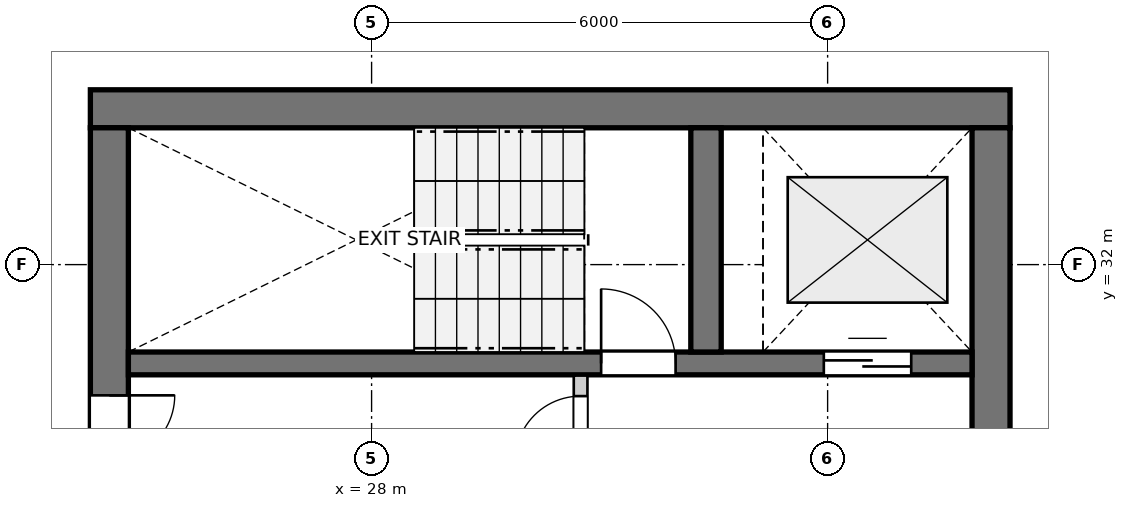
"""IFC4 building model, lengths in metres.
Left out: names, types, materials, properties, quantities, classifications, styles, units other than length and angle.
Written with IfcOpenShell. Run it as: python <this file> out.ifc"""

import sys

from ifc_helpers import new_model, si_unit, direction, frame, frame_2d, origin, place, context, subcontext, project, spatial, rectangle, extrude, source, transform, mapped, element, fill, save


model = new_model("IFC4")
c1 = context("Model", 3, precision=1e-05, world=origin(), true_north=direction((0.0, 1.0)))
c2 = subcontext(c1, "Body", "Model", "MODEL_VIEW")
j1 = project(units=[si_unit("LENGTHUNIT", "METRE"), si_unit("PLANEANGLEUNIT", "RADIAN")], contexts=[c1])
p1 = place(None, origin())
s1 = spatial("IfcSite", under=j1, at=p1, CompositionType="ELEMENT")
p2 = place(p1, origin())
s2 = spatial("IfcBuilding", under=s1, at=p2, CompositionType="ELEMENT")
p3 = place(p2, frame((0.0, 0.0, 198.8)))
s3 = spatial("IfcBuildingStorey", under=s2, at=p3, CompositionType="ELEMENT", Elevation=198.8)
p4 = place(p3, frame((36.4, 34.05, 0.0), z_axis=(0.0, 0.0, 1.0), x_axis=(-1.0, 0.0, 0.0)))
e1 = element("IfcWall", 1, at=p4, inside=s3, PredefinedType="SHEAR", context=c2, shape_type="SweptSolid", body=[
    extrude(rectangle(XDim=12.1, YDim=0.5, at=frame_2d((6.05, 0.0))), origin(), (0.0, 0.0, 1.0), 2.96),
])
p5 = place(p3, frame((24.55, 33.8, 0.0), z_axis=(0.0, 0.0, 1.0), x_axis=(0.0, -1.0, 0.0)))
e2 = element("IfcWall", 2, at=p5, inside=s3, PredefinedType="SHEAR", context=c2, shape_type="SweptSolid", body=[
    extrude(rectangle(XDim=15.6, YDim=0.5, at=frame_2d((7.8, 0.0))), origin(), (0.0, 0.0, 1.0), 2.96),
])
p6 = place(p5, frame((7.05, 0.0, 0.0)))
e3 = element("IfcOpeningElement", 3, at=p6, cuts=e2, PredefinedType="OPENING", context=c2, shape_type="SweptSolid", body=[
    extrude(rectangle(XDim=1.5, YDim=2.15, at=frame_2d((0.75, 1.075))), frame((0.0, 0.26, 0.0), z_axis=(0.0, -1.0, 0.0), x_axis=(1.0, 0.0, 0.0)), (0.0, 0.0, 1.0), 0.52),
])
p7 = place(p5, frame((3.52, 0.0, 0.0)))
e4 = element("IfcOpeningElement", 4, at=p7, cuts=e2, PredefinedType="OPENING", context=c2, shape_type="SweptSolid", body=[
    extrude(rectangle(XDim=0.86, YDim=2.05, at=frame_2d((0.43, 1.025))), frame((0.0, 0.26, 0.0), z_axis=(0.0, -1.0, 0.0), x_axis=(1.0, 0.0, 0.0)), (0.0, 0.0, 1.0), 0.52),
])
p8 = place(p5, frame((11.22, 0.0, 0.0)))
e5 = element("IfcOpeningElement", 5, at=p8, cuts=e2, PredefinedType="OPENING", context=c2, shape_type="SweptSolid", body=[
    extrude(rectangle(XDim=0.86, YDim=2.05, at=frame_2d((0.43, 1.025))), frame((0.0, 0.26, 0.0), z_axis=(0.0, -1.0, 0.0), x_axis=(1.0, 0.0, 0.0)), (0.0, 0.0, 1.0), 0.52),
])
p9 = place(p3, frame((36.15, 18.2, 0.0), z_axis=(0.0, 0.0, 1.0), x_axis=(0.0, 1.0, 0.0)))
e6 = element("IfcWall", 6, at=p9, inside=s3, PredefinedType="SHEAR", context=c2, shape_type="SweptSolid", body=[
    extrude(rectangle(XDim=15.6, YDim=0.5, at=frame_2d((7.8, 0.0))), origin(), (0.0, 0.0, 1.0), 2.96),
])
p10 = place(p9, frame((4.25, 0.0, 0.0)))
e7 = element("IfcOpeningElement", 7, at=p10, cuts=e6, PredefinedType="OPENING", context=c2, shape_type="SweptSolid", body=[
    extrude(rectangle(XDim=1.1, YDim=2.15, at=frame_2d((0.55, 1.075))), frame((0.0, 0.26, 0.0), z_axis=(0.0, -1.0, 0.0), x_axis=(1.0, 0.0, 0.0)), (0.0, 0.0, 1.0), 0.52),
])
p11 = place(p9, frame((10.25, 0.0, 0.0)))
e8 = element("IfcOpeningElement", 8, at=p11, cuts=e6, PredefinedType="OPENING", context=c2, shape_type="SweptSolid", body=[
    extrude(rectangle(XDim=1.1, YDim=2.15, at=frame_2d((0.55, 1.075))), frame((0.0, 0.26, 0.0), z_axis=(0.0, -1.0, 0.0), x_axis=(1.0, 0.0, 0.0)), (0.0, 0.0, 1.0), 0.52),
])
p12 = place(p3, frame((24.8, 30.7, 0.0), z_axis=(0.0, 0.0, 1.0), x_axis=(1.0, 0.0, 0.0)))
e9 = element("IfcWall", 9, at=p12, inside=s3, PredefinedType="SHEAR", context=c2, shape_type="SweptSolid", body=[
    extrude(rectangle(XDim=11.1, YDim=0.3, at=frame_2d((5.55, 0.0))), origin(), (0.0, 0.0, 1.0), 2.96),
])
p13 = place(p12, frame((6.22, 0.0, 0.0)))
e10 = element("IfcOpeningElement", 10, at=p13, cuts=e9, PredefinedType="OPENING", context=c2, shape_type="SweptSolid", body=[
    extrude(rectangle(XDim=0.98, YDim=2.15, at=frame_2d((0.49, 1.075))), frame((0.0, 0.16, 0.0), z_axis=(0.0, -1.0, 0.0), x_axis=(1.0, 0.0, 0.0)), (0.0, 0.0, 1.0), 0.32),
])
p14 = place(p12, frame((9.15, 0.0, 0.0)))
e11 = element("IfcOpeningElement", 11, at=p14, cuts=e9, PredefinedType="OPENING", context=c2, shape_type="SweptSolid", body=[
    extrude(rectangle(XDim=1.15, YDim=2.15, at=frame_2d((0.575, 1.075))), frame((0.0, 0.16, 0.0), z_axis=(0.0, -1.0, 0.0), x_axis=(1.0, 0.0, 0.0)), (0.0, 0.0, 1.0), 0.32),
])
p15 = place(p3, frame((32.4, 30.85, 0.0), z_axis=(0.0, 0.0, 1.0), x_axis=(0.0, 1.0, 0.0)))
e12 = element("IfcWall", 12, at=p15, inside=s3, PredefinedType="SHEAR", context=c2, shape_type="SweptSolid", body=[
    extrude(rectangle(XDim=2.95, YDim=0.4, at=frame_2d((1.475, 0.0))), origin(), (0.0, 0.0, 1.0), 2.96),
])
p16 = place(p3, frame((30.75, 27.43, 0.0), z_axis=(0.0, 0.0, 1.0), x_axis=(0.0, 1.0, 0.0)))
e13 = element("IfcWall", 13, at=p16, inside=s3, PredefinedType="PARTITIONING", context=c2, shape_type="SweptSolid", body=[
    extrude(rectangle(XDim=3.11, YDim=0.18, at=frame_2d((1.555, 0.0))), origin(), (0.0, 0.0, 1.0), 2.96),
])
p17 = place(p16, frame((1.98, 0.0, 0.0)))
e14 = element("IfcOpeningElement", 14, at=p17, cuts=e13, PredefinedType="OPENING", context=c2, shape_type="SweptSolid", body=[
    extrude(rectangle(XDim=0.86, YDim=2.05, at=frame_2d((0.43, 1.025))), frame((0.0, 0.1, 0.0), z_axis=(0.0, -1.0, 0.0), x_axis=(1.0, 0.0, 0.0)), (0.0, 0.0, 1.0), 0.2),
])
m1 = source(origin(), c2, "Body", "SweptSolid", [
    extrude(rectangle(XDim=0.98, YDim=2.15, at=frame_2d((0.49, 1.075))), frame((0.0, 0.025, 0.0), z_axis=(0.0, -1.0, 0.0), x_axis=(1.0, 0.0, 0.0)), (0.0, 0.0, 1.0), 0.05),
])
p18 = place(p13, origin())
e15 = element("IfcDoor", 15, at=p18, inside=s3, OperationType="SINGLE_SWING_LEFT", PredefinedType="DOOR", context=c2, shape_type="MappedRepresentation", body=[
    mapped(m1, transform((0.0, 0.0, 0.0), x_axis=(1.0, 0.0, 0.0), y_axis=(0.0, 1.0, 0.0), z_axis=(0.0, 0.0, 1.0), scale=1.0)),
])
fill(e10, e15)
m2 = source(origin(), c2, "Body", "SweptSolid", [
    extrude(rectangle(XDim=1.15, YDim=2.15, at=frame_2d((0.575, 1.075))), frame((0.0, 0.025, 0.0), z_axis=(0.0, -1.0, 0.0), x_axis=(1.0, 0.0, 0.0)), (0.0, 0.0, 1.0), 0.05),
])
p19 = place(p14, origin())
e16 = element("IfcDoor", 16, at=p19, inside=s3, OperationType="DOUBLE_DOOR_SLIDING", PredefinedType="DOOR", context=c2, shape_type="MappedRepresentation", body=[
    mapped(m2, transform((0.0, 0.0, 0.0), x_axis=(1.0, 0.0, 0.0), y_axis=(0.0, 1.0, 0.0), z_axis=(0.0, 0.0, 1.0), scale=1.0)),
])
fill(e11, e16)
m3 = source(origin(), c2, "Body", "SweptSolid", [
    extrude(rectangle(XDim=0.86, YDim=2.05, at=frame_2d((0.43, 1.025))), frame((0.0, 0.025, 0.0), z_axis=(0.0, -1.0, 0.0), x_axis=(1.0, 0.0, 0.0)), (0.0, 0.0, 1.0), 0.05),
])
p20 = place(p7, origin())
e17 = element("IfcDoor", 17, at=p20, inside=s3, OperationType="SINGLE_SWING_LEFT", PredefinedType="DOOR", context=c2, shape_type="MappedRepresentation", body=[
    mapped(m3, transform((0.0, 0.0, 0.0), x_axis=(1.0, 0.0, 0.0), y_axis=(0.0, 1.0, 0.0), z_axis=(0.0, 0.0, 1.0), scale=1.0)),
])
fill(e4, e17)
p21 = place(p17, origin())
e18 = element("IfcDoor", 18, at=p21, inside=s3, OperationType="SINGLE_SWING_LEFT", PredefinedType="DOOR", context=c2, shape_type="MappedRepresentation", body=[
    mapped(m3, transform((0.0, 0.0, 0.0), x_axis=(1.0, 0.0, 0.0), y_axis=(0.0, 1.0, 0.0), z_axis=(0.0, 0.0, 1.0), scale=1.0)),
])
fill(e14, e18)
save(model, sys.argv[1])
